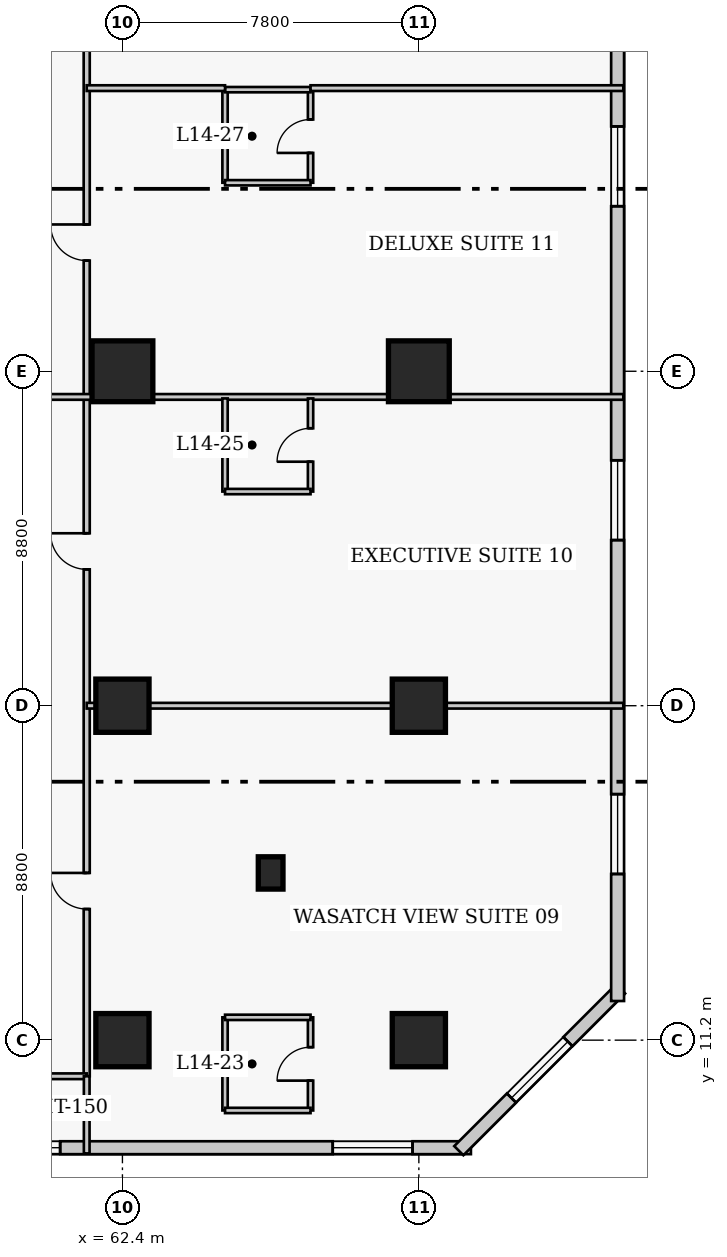
"""IFC4 building model, lengths in metres.
Left out: names, types, materials, properties, quantities, classifications, styles, units other than length and angle.
Written with IfcOpenShell. Run it as: python <this file> out.ifc"""

import sys

from ifc_helpers import new_model, si_unit, direction, frame, frame_2d, origin, origin_2d, place, context, subcontext, project, spatial, rectangle, extrude, element, fill, save


model = new_model("IFC4")
c1 = context("Model", 3, precision=1e-05, world=origin(), true_north=direction((0.0, 1.0)))
c2 = subcontext(c1, "Body", "Model", "MODEL_VIEW")
j1 = project(units=[si_unit("LENGTHUNIT", "METRE"), si_unit("PLANEANGLEUNIT", "RADIAN")], contexts=[c1])
p1 = place(None, origin())
s1 = spatial("IfcSite", under=j1, at=p1, CompositionType="ELEMENT")
p2 = place(p1, origin())
s2 = spatial("IfcBuilding", under=s1, at=p2, CompositionType="ELEMENT")
p3 = place(p2, frame((0.0, 0.0, 60.2)))
s3 = spatial("IfcBuildingStorey", under=s2, at=p3, CompositionType="ELEMENT", Elevation=60.2)
for number, where, z_axis, x_axis in (
    (1, (62.4, 11.2, 0.0), (0.0, 0.0, 1.0), (1.0, 0.0, 0.0)),
    (2, (62.4, 20.0, 0.0), (0.0, 0.0, 1.0), (1.0, 0.0, 0.0)),
):
    element("IfcColumn", number, at=place(p3, frame(where, z_axis=z_axis, x_axis=x_axis)), inside=s3, PredefinedType="COLUMN", context=c2, shape_type="SweptSolid", body=[
        extrude(rectangle(XDim=1.4, YDim=1.4, at=origin_2d()), origin(), (0.0, 0.0, 1.0), 3.8),
    ])
p4 = place(p3, frame((62.4, 28.8, 0.0), z_axis=(0.0, 0.0, 1.0), x_axis=(1.0, 0.0, 0.0)))
e3 = element("IfcColumn", 3, at=p4, inside=s3, PredefinedType="COLUMN", context=c2, shape_type="SweptSolid", body=[
    extrude(rectangle(XDim=1.6, YDim=1.6, at=origin_2d()), origin(), (0.0, 0.0, 1.0), 3.8),
])
for number, where, z_axis, x_axis in (
    (4, (70.2, 11.2, 0.0), (0.0, 0.0, 1.0), (1.0, 0.0, 0.0)),
    (5, (70.2, 20.0, 0.0), (0.0, 0.0, 1.0), (1.0, 0.0, 0.0)),
):
    element("IfcColumn", number, at=place(p3, frame(where, z_axis=z_axis, x_axis=x_axis)), inside=s3, PredefinedType="COLUMN", context=c2, shape_type="SweptSolid", body=[
        extrude(rectangle(XDim=1.4, YDim=1.4, at=origin_2d()), origin(), (0.0, 0.0, 1.0), 3.8),
    ])
p5 = place(p3, frame((70.2, 28.8, 0.0), z_axis=(0.0, 0.0, 1.0), x_axis=(1.0, 0.0, 0.0)))
e6 = element("IfcColumn", 6, at=p5, inside=s3, PredefinedType="COLUMN", context=c2, shape_type="SweptSolid", body=[
    extrude(rectangle(XDim=1.6, YDim=1.6, at=origin_2d()), origin(), (0.0, 0.0, 1.0), 3.8),
])
p6 = place(p3, frame((66.3, 15.6, 0.0), z_axis=(0.0, 0.0, 1.0), x_axis=(1.0, 0.0, 0.0)))
e7 = element("IfcColumn", 7, at=p6, inside=s3, PredefinedType="PILASTER", context=c2, shape_type="SweptSolid", body=[
    extrude(rectangle(XDim=0.65, YDim=0.85, at=origin_2d()), origin(), (0.0, 0.0, 1.0), 3.8),
])
p7 = place(p3, frame((41.68, 8.37, 0.0), z_axis=(0.0, 0.0, 1.0), x_axis=(1.0, 0.0, 0.0)))
e8 = element("IfcWall", 8, at=p7, inside=s3, PredefinedType="SOLIDWALL", context=c2, shape_type="SweptSolid", body=[
    extrude(rectangle(XDim=29.89, YDim=0.34, at=frame_2d((14.945, 0.0))), origin(), (0.0, 0.0, 1.0), 3.54),
])
p8 = place(p7, frame((2.036, 0.0, 0.85)))
e9 = element("IfcOpeningElement", 9, at=p8, cuts=e8, PredefinedType="OPENING", context=c2, shape_type="SweptSolid", body=[
    extrude(rectangle(XDim=2.1, YDim=1.85, at=frame_2d((1.05, 0.925))), frame((0.0, 0.18, 0.0), z_axis=(0.0, -1.0, 0.0), x_axis=(1.0, 0.0, 0.0)), (0.0, 0.0, 1.0), 0.36),
])
p9 = place(p7, frame((9.509, 0.0, 0.85)))
e10 = element("IfcOpeningElement", 10, at=p9, cuts=e8, PredefinedType="OPENING", context=c2, shape_type="SweptSolid", body=[
    extrude(rectangle(XDim=2.1, YDim=1.85, at=frame_2d((1.05, 0.925))), frame((0.0, 0.18, 0.0), z_axis=(0.0, -1.0, 0.0), x_axis=(1.0, 0.0, 0.0)), (0.0, 0.0, 1.0), 0.36),
])
p10 = place(p7, frame((16.981, 0.0, 0.85)))
e11 = element("IfcOpeningElement", 11, at=p10, cuts=e8, PredefinedType="OPENING", context=c2, shape_type="SweptSolid", body=[
    extrude(rectangle(XDim=2.1, YDim=1.85, at=frame_2d((1.05, 0.925))), frame((0.0, 0.18, 0.0), z_axis=(0.0, -1.0, 0.0), x_axis=(1.0, 0.0, 0.0)), (0.0, 0.0, 1.0), 0.36),
])
p11 = place(p7, frame((26.254, 0.0, 0.85)))
e12 = element("IfcOpeningElement", 12, at=p11, cuts=e8, PredefinedType="OPENING", context=c2, shape_type="SweptSolid", body=[
    extrude(rectangle(XDim=2.1, YDim=1.85, at=frame_2d((1.05, 0.925))), frame((0.0, 0.18, 0.0), z_axis=(0.0, -1.0, 0.0), x_axis=(1.0, 0.0, 0.0)), (0.0, 0.0, 1.0), 0.36),
])
p12 = place(p7, frame((14.265, 0.0, 0.85)))
e13 = element("IfcOpeningElement", 13, at=p12, cuts=e8, PredefinedType="OPENING", context=c2, shape_type="SweptSolid", body=[
    extrude(rectangle(XDim=1.3, YDim=1.7, at=frame_2d((0.65, 0.85))), frame((0.0, 0.18, 0.0), z_axis=(0.0, -1.0, 0.0), x_axis=(1.0, 0.0, 0.0)), (0.0, 0.0, 1.0), 0.36),
])
p13 = place(p3, frame((71.251, 8.292, 0.0), z_axis=(0.0, 0.0, 1.0), x_axis=(0.707106781187, 0.707106781187, 0.0)))
e14 = element("IfcWall", 14, at=p13, inside=s3, PredefinedType="SOLIDWALL", context=c2, shape_type="SweptSolid", body=[
    extrude(rectangle(XDim=6.02, YDim=0.34, at=frame_2d((3.01, 0.0))), origin(), (0.0, 0.0, 1.0), 3.54),
])
p14 = place(p13, frame((1.96, 0.0, 0.85)))
e15 = element("IfcOpeningElement", 15, at=p14, cuts=e14, PredefinedType="OPENING", context=c2, shape_type="SweptSolid", body=[
    extrude(rectangle(XDim=2.1, YDim=1.85, at=frame_2d((1.05, 0.925))), frame((0.0, 0.18, 0.0), z_axis=(0.0, -1.0, 0.0), x_axis=(1.0, 0.0, 0.0)), (0.0, 0.0, 1.0), 0.36),
])
p15 = place(p3, frame((75.43, 12.23, 0.0), z_axis=(0.0, 0.0, 1.0), x_axis=(0.0, 1.0, 0.0)))
e16 = element("IfcWall", 16, at=p15, inside=s3, PredefinedType="SOLIDWALL", context=c2, shape_type="SweptSolid", body=[
    extrude(rectangle(XDim=35.14, YDim=0.34, at=frame_2d((17.57, 0.0))), origin(), (0.0, 0.0, 1.0), 3.54),
])
p16 = place(p15, frame((3.343, 0.0, 0.85)))
e17 = element("IfcOpeningElement", 17, at=p16, cuts=e16, PredefinedType="OPENING", context=c2, shape_type="SweptSolid", body=[
    extrude(rectangle(XDim=2.1, YDim=1.85, at=frame_2d((1.05, 0.925))), frame((0.0, 0.18, 0.0), z_axis=(0.0, -1.0, 0.0), x_axis=(1.0, 0.0, 0.0)), (0.0, 0.0, 1.0), 0.36),
])
p17 = place(p15, frame((12.127, 0.0, 0.85)))
e18 = element("IfcOpeningElement", 18, at=p17, cuts=e16, PredefinedType="OPENING", context=c2, shape_type="SweptSolid", body=[
    extrude(rectangle(XDim=2.1, YDim=1.85, at=frame_2d((1.05, 0.925))), frame((0.0, 0.18, 0.0), z_axis=(0.0, -1.0, 0.0), x_axis=(1.0, 0.0, 0.0)), (0.0, 0.0, 1.0), 0.36),
])
p18 = place(p15, frame((20.913, 0.0, 0.85)))
e19 = element("IfcOpeningElement", 19, at=p18, cuts=e16, PredefinedType="OPENING", context=c2, shape_type="SweptSolid", body=[
    extrude(rectangle(XDim=2.1, YDim=1.85, at=frame_2d((1.05, 0.925))), frame((0.0, 0.18, 0.0), z_axis=(0.0, -1.0, 0.0), x_axis=(1.0, 0.0, 0.0)), (0.0, 0.0, 1.0), 0.36),
])
p19 = place(p15, frame((29.698, 0.0, 0.85)))
e20 = element("IfcOpeningElement", 20, at=p19, cuts=e16, PredefinedType="OPENING", context=c2, shape_type="SweptSolid", body=[
    extrude(rectangle(XDim=2.1, YDim=1.85, at=frame_2d((1.05, 0.925))), frame((0.0, 0.18, 0.0), z_axis=(0.0, -1.0, 0.0), x_axis=(1.0, 0.0, 0.0)), (0.0, 0.0, 1.0), 0.36),
])
p20 = place(p3, frame((61.46, 10.25, 0.0), z_axis=(0.0, 0.0, 1.0), x_axis=(0.0, 1.0, 0.0)))
e21 = element("IfcWall", 21, at=p20, inside=s3, PredefinedType="PARTITIONING", context=c2, shape_type="SweptSolid", body=[
    extrude(rectangle(XDim=30.4, YDim=0.16, at=frame_2d((15.2, 0.0))), origin(), (0.0, 0.0, 1.0), 3.54),
])
p21 = place(p20, frame((4.4, 0.0, 0.0)))
e22 = element("IfcOpeningElement", 22, at=p21, cuts=e21, PredefinedType="OPENING", context=c2, shape_type="SweptSolid", body=[
    extrude(rectangle(XDim=0.95, YDim=2.1, at=frame_2d((0.475, 1.05))), frame((0.0, 0.09, 0.0), z_axis=(0.0, -1.0, 0.0), x_axis=(1.0, 0.0, 0.0)), (0.0, 0.0, 1.0), 0.18),
])
p22 = place(p20, frame((13.337, 0.0, 0.0)))
e23 = element("IfcOpeningElement", 23, at=p22, cuts=e21, PredefinedType="OPENING", context=c2, shape_type="SweptSolid", body=[
    extrude(rectangle(XDim=0.95, YDim=2.1, at=frame_2d((0.475, 1.05))), frame((0.0, 0.09, 0.0), z_axis=(0.0, -1.0, 0.0), x_axis=(1.0, 0.0, 0.0)), (0.0, 0.0, 1.0), 0.18),
])
p23 = place(p20, frame((21.462, 0.0, 0.0)))
e24 = element("IfcOpeningElement", 24, at=p23, cuts=e21, PredefinedType="OPENING", context=c2, shape_type="SweptSolid", body=[
    extrude(rectangle(XDim=0.95, YDim=2.1, at=frame_2d((0.475, 1.05))), frame((0.0, 0.09, 0.0), z_axis=(0.0, -1.0, 0.0), x_axis=(1.0, 0.0, 0.0)), (0.0, 0.0, 1.0), 0.18),
])
p24 = place(p20, frame((28.96, 0.0, 0.0)))
e25 = element("IfcOpeningElement", 25, at=p24, cuts=e21, PredefinedType="OPENING", context=c2, shape_type="SweptSolid", body=[
    extrude(rectangle(XDim=1.0, YDim=2.15, at=frame_2d((0.5, 1.075))), frame((0.0, 0.09, 0.0), z_axis=(0.0, -1.0, 0.0), x_axis=(1.0, 0.0, 0.0)), (0.0, 0.0, 1.0), 0.18),
])
p25 = place(p3, frame((59.24, 10.25, 0.0), z_axis=(0.0, 0.0, 1.0), x_axis=(1.0, 0.0, 0.0)))
e26 = element("IfcWall", 26, at=p25, inside=s3, PredefinedType="PARTITIONING", context=c2, shape_type="SweptSolid", body=[
    extrude(rectangle(XDim=2.22, YDim=0.15, at=frame_2d((1.11, 0.0))), origin(), (0.0, 0.0, 1.0), 3.54),
])
p26 = place(p3, frame((61.46, 8.22, 0.0), z_axis=(0.0, 0.0, 1.0), x_axis=(0.0, 1.0, 0.0)))
e27 = element("IfcWall", 27, at=p26, inside=s3, PredefinedType="PARTITIONING", context=c2, shape_type="SweptSolid", body=[
    extrude(rectangle(XDim=2.03, YDim=0.15, at=frame_2d((1.015, 0.0))), origin(), (0.0, 0.0, 1.0), 3.54),
])
p27 = place(p3, frame((65.1, 9.35, 0.0), z_axis=(0.0, 0.0, 1.0), x_axis=(0.0, 1.0, 0.0)))
e28 = element("IfcWall", 28, at=p27, inside=s3, PredefinedType="PLUMBINGWALL", context=c2, shape_type="SweptSolid", body=[
    extrude(rectangle(XDim=2.45, YDim=0.14, at=frame_2d((1.225, 0.0))), origin(), (0.0, 0.0, 1.0), 3.54),
])
p28 = place(p3, frame((67.35, 9.35, 0.0), z_axis=(0.0, 0.0, 1.0), x_axis=(0.0, 1.0, 0.0)))
e29 = element("IfcWall", 29, at=p28, inside=s3, PredefinedType="PLUMBINGWALL", context=c2, shape_type="SweptSolid", body=[
    extrude(rectangle(XDim=2.45, YDim=0.14, at=frame_2d((1.225, 0.0))), origin(), (0.0, 0.0, 1.0), 3.54),
])
p29 = place(p28, frame((0.785, 0.0, 0.0)))
e30 = element("IfcOpeningElement", 30, at=p29, cuts=e29, PredefinedType="OPENING", context=c2, shape_type="SweptSolid", body=[
    extrude(rectangle(XDim=0.88, YDim=2.05, at=frame_2d((0.44, 1.025))), frame((0.0, 0.08, 0.0), z_axis=(0.0, -1.0, 0.0), x_axis=(1.0, 0.0, 0.0)), (0.0, 0.0, 1.0), 0.16),
])
for number, where, z_axis, x_axis in (
    (31, (65.1, 9.35, 0.0), (0.0, 0.0, 1.0), (1.0, 0.0, 0.0)),
    (32, (65.1, 11.8, 0.0), (0.0, 0.0, 1.0), (1.0, 0.0, 0.0)),
):
    element("IfcWall", number, at=place(p3, frame(where, z_axis=z_axis, x_axis=x_axis)), inside=s3, PredefinedType="PLUMBINGWALL", context=c2, shape_type="SweptSolid", body=[
        extrude(rectangle(XDim=2.25, YDim=0.14, at=frame_2d((1.125, 0.0))), origin(), (0.0, 0.0, 1.0), 3.54),
    ])
p30 = place(p3, frame((61.46, 20.0, 0.0), z_axis=(0.0, 0.0, 1.0), x_axis=(1.0, 0.0, 0.0)))
e33 = element("IfcWall", 33, at=p30, inside=s3, PredefinedType="PARTITIONING", context=c2, shape_type="SweptSolid", body=[
    extrude(rectangle(XDim=14.12, YDim=0.15, at=frame_2d((7.06, 0.0))), origin(), (0.0, 0.0, 1.0), 2.593),
])
p31 = place(p3, frame((59.51, 28.125, 0.0), z_axis=(0.0, 0.0, 1.0), x_axis=(1.0, 0.0, 0.0)))
e34 = element("IfcWall", 34, at=p31, inside=s3, PredefinedType="PARTITIONING", context=c2, shape_type="SweptSolid", body=[
    extrude(rectangle(XDim=16.07, YDim=0.15, at=frame_2d((8.035, 0.0))), origin(), (0.0, 0.0, 1.0), 3.54),
])
p32 = place(p3, frame((65.1, 25.635, 0.0), z_axis=(0.0, 0.0, 1.0), x_axis=(0.0, 1.0, 0.0)))
e35 = element("IfcWall", 35, at=p32, inside=s3, PredefinedType="PLUMBINGWALL", context=c2, shape_type="SweptSolid", body=[
    extrude(rectangle(XDim=2.45, YDim=0.14, at=frame_2d((1.225, 0.0))), origin(), (0.0, 0.0, 1.0), 3.54),
])
p33 = place(p3, frame((67.35, 25.635, 0.0), z_axis=(0.0, 0.0, 1.0), x_axis=(0.0, 1.0, 0.0)))
e36 = element("IfcWall", 36, at=p33, inside=s3, PredefinedType="PLUMBINGWALL", context=c2, shape_type="SweptSolid", body=[
    extrude(rectangle(XDim=2.45, YDim=0.14, at=frame_2d((1.225, 0.0))), origin(), (0.0, 0.0, 1.0), 3.54),
])
p34 = place(p33, frame((0.785, 0.0, 0.0)))
e37 = element("IfcOpeningElement", 37, at=p34, cuts=e36, PredefinedType="OPENING", context=c2, shape_type="SweptSolid", body=[
    extrude(rectangle(XDim=0.88, YDim=2.05, at=frame_2d((0.44, 1.025))), frame((0.0, 0.08, 0.0), z_axis=(0.0, -1.0, 0.0), x_axis=(1.0, 0.0, 0.0)), (0.0, 0.0, 1.0), 0.16),
])
p35 = place(p3, frame((65.1, 25.635, 0.0), z_axis=(0.0, 0.0, 1.0), x_axis=(1.0, 0.0, 0.0)))
e38 = element("IfcWall", 38, at=p35, inside=s3, PredefinedType="PLUMBINGWALL", context=c2, shape_type="SweptSolid", body=[
    extrude(rectangle(XDim=2.25, YDim=0.14, at=frame_2d((1.125, 0.0))), origin(), (0.0, 0.0, 1.0), 3.54),
])
p36 = place(p3, frame((65.1, 33.76, 0.0), z_axis=(0.0, 0.0, 1.0), x_axis=(0.0, 1.0, 0.0)))
e39 = element("IfcWall", 39, at=p36, inside=s3, PredefinedType="PLUMBINGWALL", context=c2, shape_type="SweptSolid", body=[
    extrude(rectangle(XDim=2.45, YDim=0.14, at=frame_2d((1.225, 0.0))), origin(), (0.0, 0.0, 1.0), 3.54),
])
p37 = place(p3, frame((67.35, 33.76, 0.0), z_axis=(0.0, 0.0, 1.0), x_axis=(0.0, 1.0, 0.0)))
e40 = element("IfcWall", 40, at=p37, inside=s3, PredefinedType="PLUMBINGWALL", context=c2, shape_type="SweptSolid", body=[
    extrude(rectangle(XDim=2.45, YDim=0.14, at=frame_2d((1.225, 0.0))), origin(), (0.0, 0.0, 1.0), 3.54),
])
p38 = place(p37, frame((0.785, 0.0, 0.0)))
e41 = element("IfcOpeningElement", 41, at=p38, cuts=e40, PredefinedType="OPENING", context=c2, shape_type="SweptSolid", body=[
    extrude(rectangle(XDim=0.88, YDim=2.05, at=frame_2d((0.44, 1.025))), frame((0.0, 0.08, 0.0), z_axis=(0.0, -1.0, 0.0), x_axis=(1.0, 0.0, 0.0)), (0.0, 0.0, 1.0), 0.16),
])
for number, where, z_axis, x_axis in (
    (42, (65.1, 33.76, 0.0), (0.0, 0.0, 1.0), (1.0, 0.0, 0.0)),
    (43, (65.1, 36.21, 0.0), (0.0, 0.0, 1.0), (1.0, 0.0, 0.0)),
):
    element("IfcWall", number, at=place(p3, frame(where, z_axis=z_axis, x_axis=x_axis)), inside=s3, PredefinedType="PLUMBINGWALL", context=c2, shape_type="SweptSolid", body=[
        extrude(rectangle(XDim=2.25, YDim=0.14, at=frame_2d((1.125, 0.0))), origin(), (0.0, 0.0, 1.0), 3.54),
    ])
p39 = place(p3, frame((61.46, 36.25, 0.0), z_axis=(0.0, 0.0, 1.0), x_axis=(1.0, 0.0, 0.0)))
e44 = element("IfcWall", 44, at=p39, inside=s3, PredefinedType="PARTITIONING", context=c2, shape_type="SweptSolid", body=[
    extrude(rectangle(XDim=3.64, YDim=0.15, at=frame_2d((1.82, 0.0))), origin(), (0.0, 0.0, 1.0), 3.54),
])
p40 = place(p3, frame((67.35, 36.25, 0.0), z_axis=(0.0, 0.0, 1.0), x_axis=(1.0, 0.0, 0.0)))
e45 = element("IfcWall", 45, at=p40, inside=s3, PredefinedType="PARTITIONING", context=c2, shape_type="SweptSolid", body=[
    extrude(rectangle(XDim=8.23, YDim=0.15, at=frame_2d((4.115, 0.0))), origin(), (0.0, 0.0, 1.0), 3.54),
])
p41 = place(p10, origin())
e46 = element("IfcWindow", 46, at=p41, inside=s3, PartitioningType="SINGLE_PANEL", PredefinedType="WINDOW", context=c2, shape_type="SweptSolid", body=[
    extrude(rectangle(XDim=2.1, YDim=1.85, at=frame_2d((1.05, 0.925))), frame((0.0, 0.03, 0.0), z_axis=(0.0, -1.0, 0.0), x_axis=(1.0, 0.0, 0.0)), (0.0, 0.0, 1.0), 0.06),
])
fill(e11, e46)
p42 = place(p11, origin())
e47 = element("IfcWindow", 47, at=p42, inside=s3, PartitioningType="SINGLE_PANEL", PredefinedType="WINDOW", context=c2, shape_type="SweptSolid", body=[
    extrude(rectangle(XDim=2.1, YDim=1.85, at=frame_2d((1.05, 0.925))), frame((0.0, 0.03, 0.0), z_axis=(0.0, -1.0, 0.0), x_axis=(1.0, 0.0, 0.0)), (0.0, 0.0, 1.0), 0.06),
])
fill(e12, e47)
p43 = place(p14, origin())
e48 = element("IfcWindow", 48, at=p43, inside=s3, PartitioningType="SINGLE_PANEL", PredefinedType="WINDOW", context=c2, shape_type="SweptSolid", body=[
    extrude(rectangle(XDim=2.1, YDim=1.85, at=frame_2d((1.05, 0.925))), frame((0.0, 0.03, 0.0), z_axis=(0.0, -1.0, 0.0), x_axis=(1.0, 0.0, 0.0)), (0.0, 0.0, 1.0), 0.06),
])
fill(e15, e48)
p44 = place(p16, origin())
e49 = element("IfcWindow", 49, at=p44, inside=s3, PartitioningType="SINGLE_PANEL", PredefinedType="WINDOW", context=c2, shape_type="SweptSolid", body=[
    extrude(rectangle(XDim=2.1, YDim=1.85, at=frame_2d((1.05, 0.925))), frame((0.0, 0.03, 0.0), z_axis=(0.0, -1.0, 0.0), x_axis=(1.0, 0.0, 0.0)), (0.0, 0.0, 1.0), 0.06),
])
fill(e17, e49)
p45 = place(p17, origin())
e50 = element("IfcWindow", 50, at=p45, inside=s3, PartitioningType="SINGLE_PANEL", PredefinedType="WINDOW", context=c2, shape_type="SweptSolid", body=[
    extrude(rectangle(XDim=2.1, YDim=1.85, at=frame_2d((1.05, 0.925))), frame((0.0, 0.03, 0.0), z_axis=(0.0, -1.0, 0.0), x_axis=(1.0, 0.0, 0.0)), (0.0, 0.0, 1.0), 0.06),
])
fill(e18, e50)
p46 = place(p18, origin())
e51 = element("IfcWindow", 51, at=p46, inside=s3, PartitioningType="SINGLE_PANEL", PredefinedType="WINDOW", context=c2, shape_type="SweptSolid", body=[
    extrude(rectangle(XDim=2.1, YDim=1.85, at=frame_2d((1.05, 0.925))), frame((0.0, 0.03, 0.0), z_axis=(0.0, -1.0, 0.0), x_axis=(1.0, 0.0, 0.0)), (0.0, 0.0, 1.0), 0.06),
])
fill(e19, e51)
p47 = place(p29, origin())
e52 = element("IfcDoor", 52, at=p47, inside=s3, OperationType="SINGLE_SWING_LEFT", PredefinedType="DOOR", context=c2, shape_type="SweptSolid", body=[
    extrude(rectangle(XDim=0.88, YDim=2.05, at=frame_2d((0.44, 1.025))), frame((0.0, 0.025, 0.0), z_axis=(0.0, -1.0, 0.0), x_axis=(1.0, 0.0, 0.0)), (0.0, 0.0, 1.0), 0.05),
])
fill(e30, e52)
p48 = place(p21, origin())
e53 = element("IfcDoor", 53, at=p48, inside=s3, OperationType="SINGLE_SWING_RIGHT", PredefinedType="DOOR", context=c2, shape_type="SweptSolid", body=[
    extrude(rectangle(XDim=0.95, YDim=2.1, at=frame_2d((0.475, 1.05))), frame((0.0, 0.025, 0.0), z_axis=(0.0, -1.0, 0.0), x_axis=(1.0, 0.0, 0.0)), (0.0, 0.0, 1.0), 0.05),
])
fill(e22, e53)
p49 = place(p34, origin())
e54 = element("IfcDoor", 54, at=p49, inside=s3, OperationType="SINGLE_SWING_LEFT", PredefinedType="DOOR", context=c2, shape_type="SweptSolid", body=[
    extrude(rectangle(XDim=0.88, YDim=2.05, at=frame_2d((0.44, 1.025))), frame((0.0, 0.025, 0.0), z_axis=(0.0, -1.0, 0.0), x_axis=(1.0, 0.0, 0.0)), (0.0, 0.0, 1.0), 0.05),
])
fill(e37, e54)
p50 = place(p22, origin())
e55 = element("IfcDoor", 55, at=p50, inside=s3, OperationType="SINGLE_SWING_RIGHT", PredefinedType="DOOR", context=c2, shape_type="SweptSolid", body=[
    extrude(rectangle(XDim=0.95, YDim=2.1, at=frame_2d((0.475, 1.05))), frame((0.0, 0.025, 0.0), z_axis=(0.0, -1.0, 0.0), x_axis=(1.0, 0.0, 0.0)), (0.0, 0.0, 1.0), 0.05),
])
fill(e23, e55)
p51 = place(p38, origin())
e56 = element("IfcDoor", 56, at=p51, inside=s3, OperationType="SINGLE_SWING_LEFT", PredefinedType="DOOR", context=c2, shape_type="SweptSolid", body=[
    extrude(rectangle(XDim=0.88, YDim=2.05, at=frame_2d((0.44, 1.025))), frame((0.0, 0.025, 0.0), z_axis=(0.0, -1.0, 0.0), x_axis=(1.0, 0.0, 0.0)), (0.0, 0.0, 1.0), 0.05),
])
fill(e41, e56)
p52 = place(p23, origin())
e57 = element("IfcDoor", 57, at=p52, inside=s3, OperationType="SINGLE_SWING_RIGHT", PredefinedType="DOOR", context=c2, shape_type="SweptSolid", body=[
    extrude(rectangle(XDim=0.95, YDim=2.1, at=frame_2d((0.475, 1.05))), frame((0.0, 0.025, 0.0), z_axis=(0.0, -1.0, 0.0), x_axis=(1.0, 0.0, 0.0)), (0.0, 0.0, 1.0), 0.05),
])
fill(e24, e57)
save(model, sys.argv[1])
